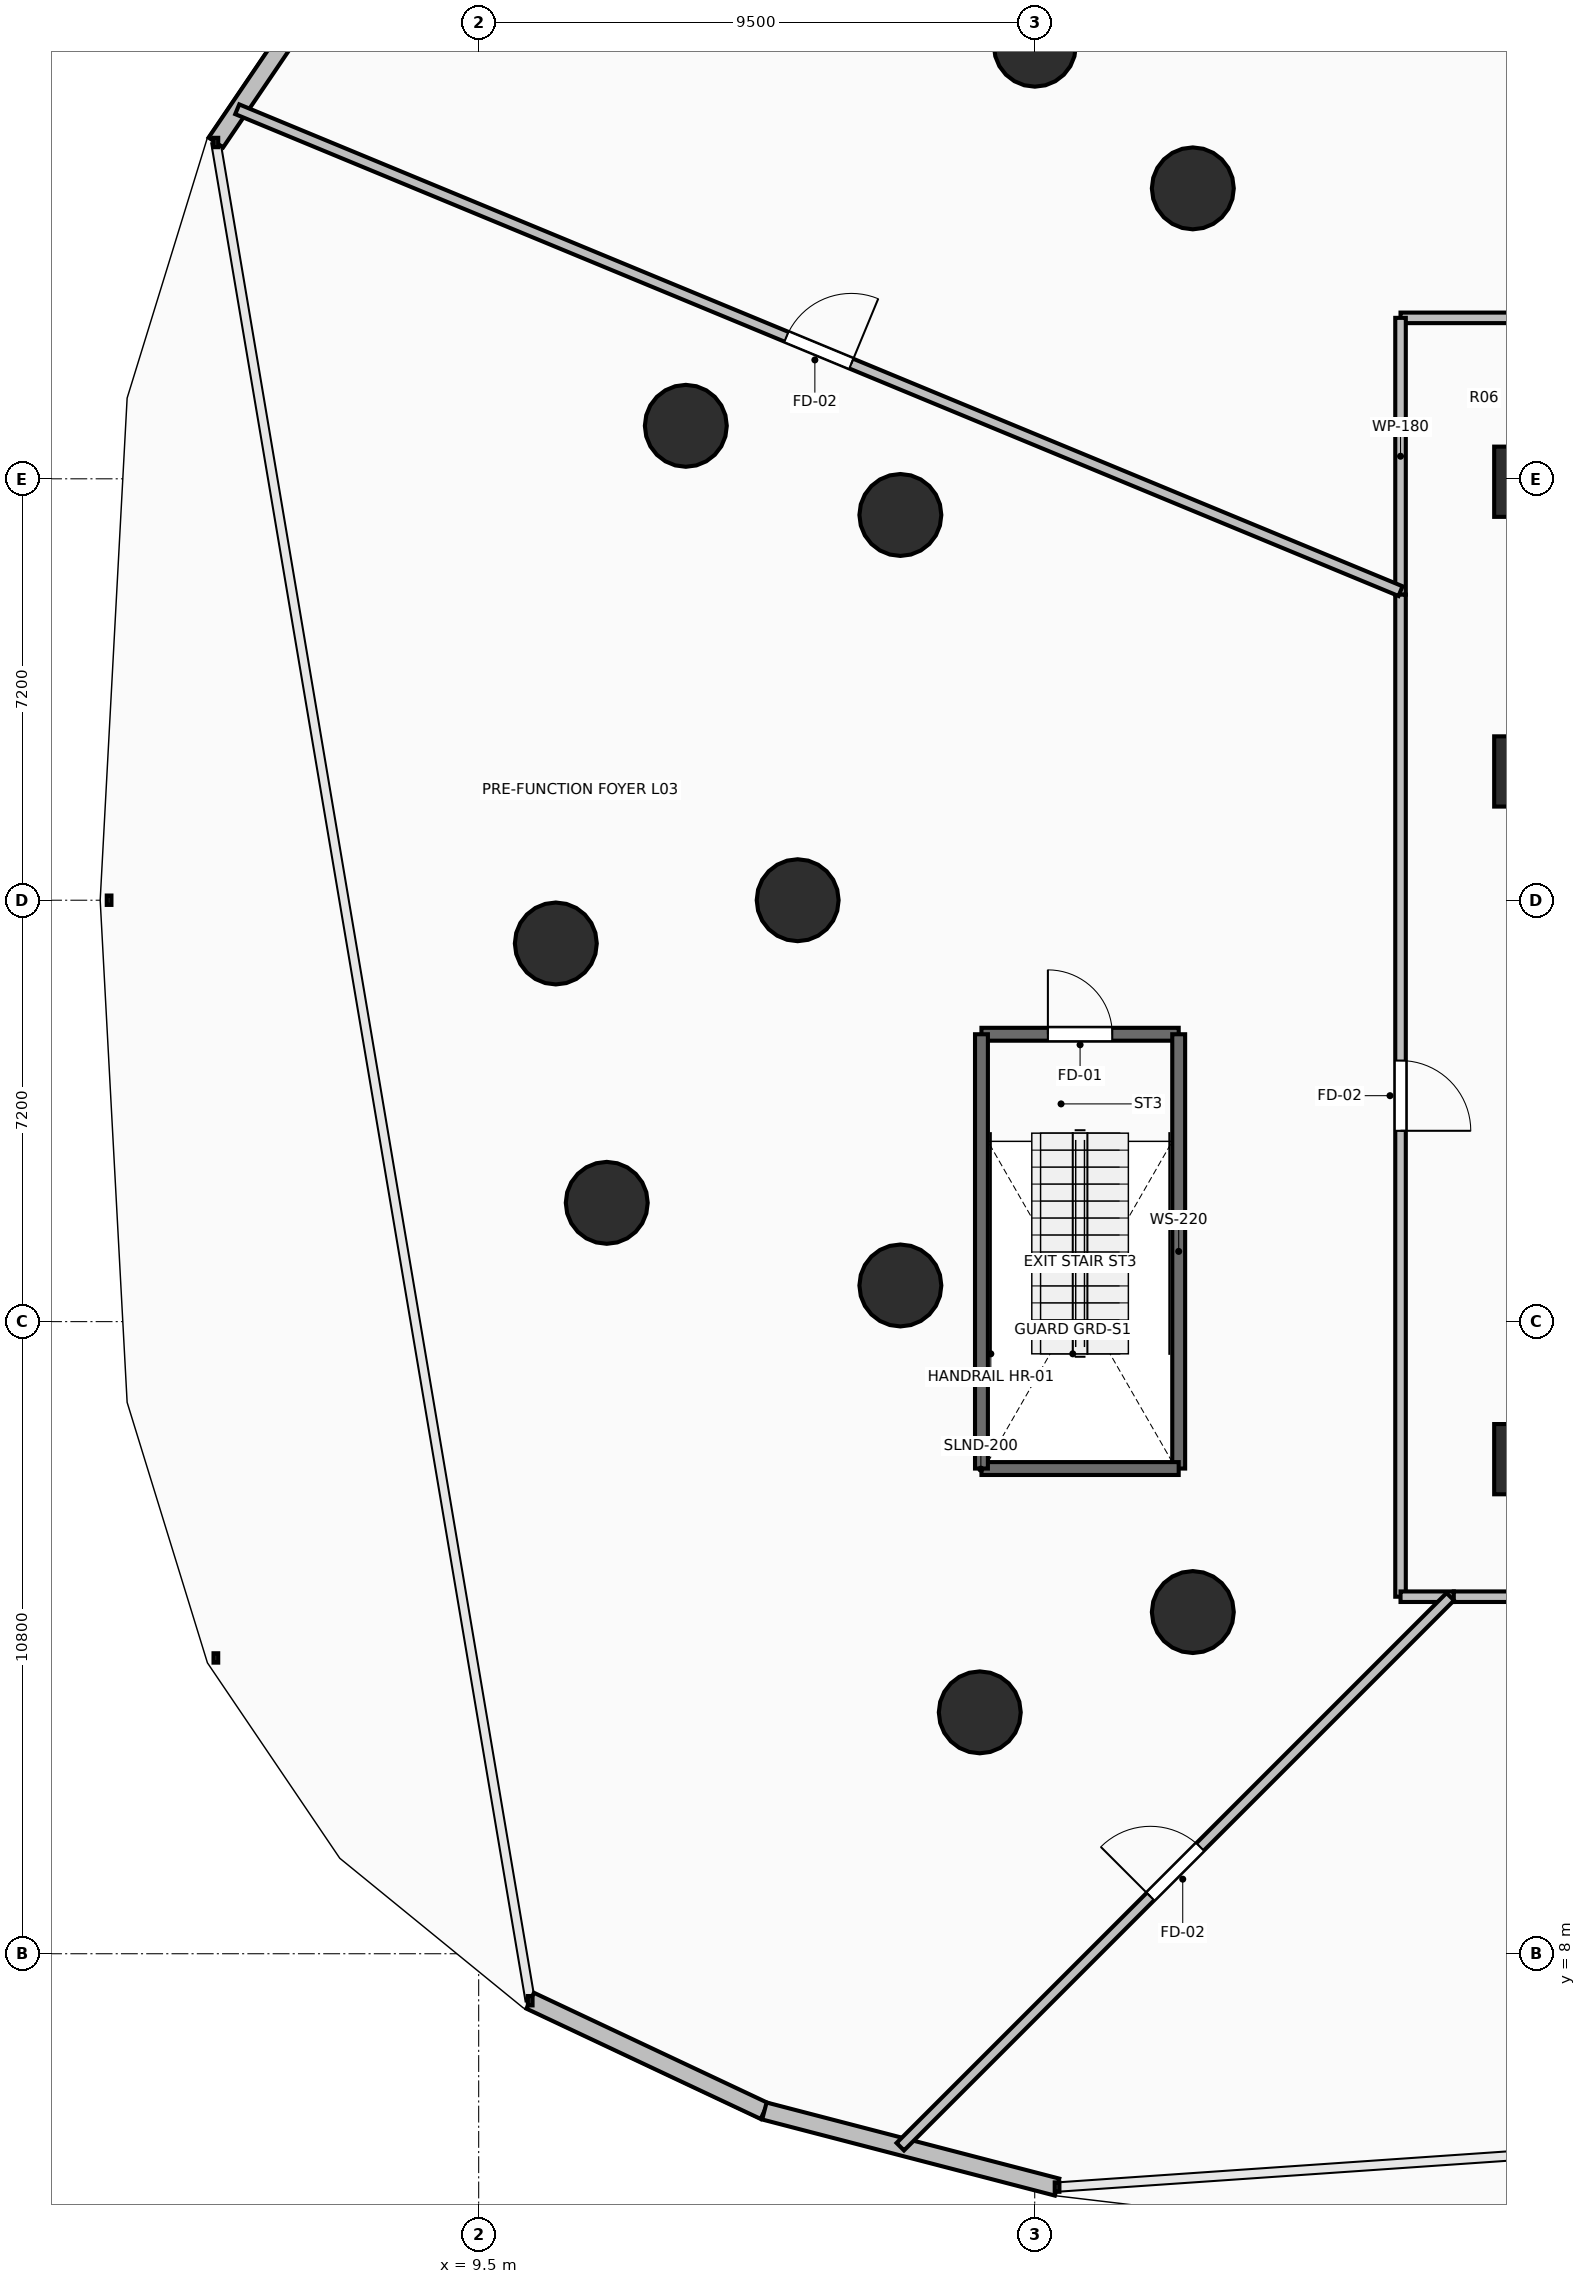
"""IFC4 building model, lengths in metres.
Left out: names, types, materials, properties, quantities, classifications, styles, units other than length and angle.
Written with IfcOpenShell. Run it as: python <this file> out.ifc"""

import sys

from ifc_helpers import new_model, si_unit, direction, frame, frame_2d, origin, origin_2d, place, context, subcontext, project, spatial, rectangle, circle, extrude, element, fill, save


model = new_model("IFC4")
c1 = context("Model", 3, precision=1e-05, world=origin(), true_north=direction((0.0, 1.0)))
c2 = subcontext(c1, "Body", "Model", "MODEL_VIEW")
j1 = project(units=[si_unit("LENGTHUNIT", "METRE"), si_unit("PLANEANGLEUNIT", "RADIAN")], contexts=[c1])
p1 = place(None, origin())
s1 = spatial("IfcSite", under=j1, at=p1, CompositionType="ELEMENT")
p2 = place(p1, origin())
s2 = spatial("IfcBuilding", under=s1, at=p2, CompositionType="ELEMENT")
p3 = place(p2, frame((0.0, 0.0, 14.4)))
s3 = spatial("IfcBuildingStorey", under=s2, at=p3, CompositionType="ELEMENT", Elevation=14.4)
for number, where, z_axis, x_axis in (
    (1, (21.701, 38.162, 0.0), (0.0, 0.0, 1.0), (-0.707, 0.707, 0.0)),
    (2, (16.705, 32.582, 0.0), (0.0, 0.0, 1.0), (-0.924, 0.383, 0.0)),
    (3, (14.95, 26.0, 0.0), (0.0, 0.0, 1.0), (-1.0, 0.0, 0.0)),
    (4, (16.705, 19.418, 0.0), (0.0, 0.0, 1.0), (-0.924, -0.383, 0.0)),
    (5, (21.701, 13.838, 0.0), (0.0, 0.0, 1.0), (-0.707, -0.707, 0.0)),
    (6, (19.003, 40.6, 0.0), (0.0, 0.0, 1.0), (-0.707, 0.707, 0.0)),
    (7, (13.039, 34.105, 0.0), (0.0, 0.0, 1.0), (-0.924, 0.383, 0.0)),
    (8, (10.818, 25.261, 0.0), (0.0, 0.0, 1.0), (-1.0, 0.0, 0.0)),
    (9, (11.688, 20.83, 0.0), (0.0, 0.0, 1.0), (-0.924, -0.383, 0.0)),
    (10, (18.061, 12.124, 0.0), (0.0, 0.0, 1.0), (-0.707, -0.707, 0.0)),
):
    element("IfcColumn", number, at=place(p3, frame(where, z_axis=z_axis, x_axis=x_axis)), inside=s3, PredefinedType="COLUMN", context=c2, shape_type="SweptSolid", body=[
        extrude(circle(Radius=0.7, at=origin_2d()), origin(), (0.0, 0.0, 1.0), 4.8),
    ])
for number, where, z_axis, x_axis in (
    (11, (27.25, 16.45, 0.0), (0.0, 0.0, 1.0), (1.0, 0.0, 0.0)),
    (12, (27.25, 28.2, 0.0), (0.0, 0.0, 1.0), (1.0, 0.0, 0.0)),
    (13, (27.25, 33.15, 0.0), (0.0, 0.0, 1.0), (1.0, 0.0, 0.0)),
):
    element("IfcColumn", number, at=place(p3, frame(where, z_axis=z_axis, x_axis=x_axis)), inside=s3, PredefinedType="PILASTER", context=c2, shape_type="SweptSolid", body=[
        extrude(rectangle(XDim=0.8, YDim=1.2, at=origin_2d()), origin(), (0.0, 0.0, 1.0), 4.8),
    ])
p4 = place(p3, frame((7.261, 42.264, 0.0), z_axis=(0.0, 0.0, 1.0), x_axis=(-0.561523750755, -0.827460619811, 0.0)))
e14 = element("IfcWall", 14, at=p4, inside=s3, PredefinedType="STANDARD", context=c2, shape_type="SweptSolid", body=[
    extrude(rectangle(XDim=4.01, YDim=0.3, at=frame_2d((2.005, 0.0))), origin(), (0.0, 0.0, 1.0), 4.48),
])
p5 = place(p3, frame((10.38, 7.198, 0.0), z_axis=(0.0, 0.0, 1.0), x_axis=(0.904701070817, -0.426046913452, 0.0)))
e15 = element("IfcWall", 15, at=p5, inside=s3, PredefinedType="STANDARD", context=c2, shape_type="SweptSolid", body=[
    extrude(rectangle(XDim=4.423, YDim=0.3, at=frame_2d((2.211, 0.0))), origin(), (0.0, 0.0, 1.0), 4.48),
])
p6 = place(p3, frame((14.381, 5.313, 0.0), z_axis=(0.0, 0.0, 1.0), x_axis=(0.967814681155, -0.251663948434, 0.0)))
e16 = element("IfcWall", 16, at=p6, inside=s3, PredefinedType="STANDARD", context=c2, shape_type="SweptSolid", body=[
    extrude(rectangle(XDim=5.167, YDim=0.3, at=frame_2d((2.583, 0.0))), origin(), (0.0, 0.0, 1.0), 4.48),
])
p7 = place(p3, frame((18.09, 23.71, 0.0), z_axis=(0.0, 0.0, 1.0), x_axis=(1.0, 0.0, 0.0)))
e17 = element("IfcWall", 17, at=p7, inside=s3, PredefinedType="SOLIDWALL", context=c2, shape_type="SweptSolid", body=[
    extrude(rectangle(XDim=3.37, YDim=0.22, at=frame_2d((1.685, 0.0))), origin(), (0.0, 0.0, 1.0), 4.48),
])
p8 = place(p7, frame((1.135, 0.0, 0.0)))
e18 = element("IfcOpeningElement", 18, at=p8, cuts=e17, PredefinedType="OPENING", context=c2, shape_type="SweptSolid", body=[
    extrude(rectangle(XDim=1.1, YDim=2.15, at=frame_2d((0.55, 1.075))), frame((0.0, 0.125, 0.0), z_axis=(0.0, -1.0, 0.0), x_axis=(1.0, 0.0, 0.0)), (0.0, 0.0, 1.0), 0.25),
])
p9 = place(p3, frame((21.46, 23.71, 0.0), z_axis=(0.0, 0.0, 1.0), x_axis=(0.0, -1.0, 0.0)))
e19 = element("IfcWall", 19, at=p9, inside=s3, PredefinedType="SOLIDWALL", context=c2, shape_type="SweptSolid", body=[
    extrude(rectangle(XDim=7.42, YDim=0.22, at=frame_2d((3.71, 0.0))), origin(), (0.0, 0.0, 1.0), 4.48),
])
p10 = place(p3, frame((21.46, 16.29, 0.0), z_axis=(0.0, 0.0, 1.0), x_axis=(-1.0, 0.0, 0.0)))
e20 = element("IfcWall", 20, at=p10, inside=s3, PredefinedType="SOLIDWALL", context=c2, shape_type="SweptSolid", body=[
    extrude(rectangle(XDim=3.37, YDim=0.22, at=frame_2d((1.685, 0.0))), origin(), (0.0, 0.0, 1.0), 4.48),
])
p11 = place(p3, frame((18.09, 16.29, 0.0), z_axis=(0.0, 0.0, 1.0), x_axis=(0.0, 1.0, 0.0)))
e21 = element("IfcWall", 21, at=p11, inside=s3, PredefinedType="SOLIDWALL", context=c2, shape_type="SweptSolid", body=[
    extrude(rectangle(XDim=7.42, YDim=0.22, at=frame_2d((3.71, 0.0))), origin(), (0.0, 0.0, 1.0), 4.48),
])
p12 = place(p3, frame((42.186, 35.95, 0.0), z_axis=(0.0, 0.0, 1.0), x_axis=(-1.0, 0.0, 0.0)))
e22 = element("IfcWall", 22, at=p12, inside=s3, PredefinedType="PARTITIONING", context=c2, shape_type="SweptSolid", body=[
    extrude(rectangle(XDim=16.936, YDim=0.18, at=frame_2d((8.468, 0.0))), origin(), (0.0, 0.0, 1.0), 3.672),
])
p13 = place(p12, frame((7.868, 0.0, 0.0)))
e23 = element("IfcOpeningElement", 23, at=p13, cuts=e22, PredefinedType="OPENING", context=c2, shape_type="SweptSolid", body=[
    extrude(rectangle(XDim=1.2, YDim=2.15, at=frame_2d((0.6, 1.075))), frame((0.0, 0.105, 0.0), z_axis=(0.0, -1.0, 0.0), x_axis=(1.0, 0.0, 0.0)), (0.0, 0.0, 1.0), 0.21),
])
p14 = place(p3, frame((25.25, 35.95, 0.0), z_axis=(0.0, 0.0, 1.0), x_axis=(0.0, -1.0, 0.0)))
e24 = element("IfcWall", 24, at=p14, inside=s3, PredefinedType="PARTITIONING", context=c2, shape_type="SweptSolid", body=[
    extrude(rectangle(XDim=4.729, YDim=0.18, at=frame_2d((2.365, 0.0))), origin(), (0.0, 0.0, 1.0), 3.672),
])
p15 = place(p3, frame((25.25, 31.221, 0.0), z_axis=(0.0, 0.0, 1.0), x_axis=(0.0, -1.0, 0.0)))
e25 = element("IfcWall", 25, at=p15, inside=s3, PredefinedType="PARTITIONING", context=c2, shape_type="SweptSolid", body=[
    extrude(rectangle(XDim=17.121, YDim=0.18, at=frame_2d((8.561, 0.0))), origin(), (0.0, 0.0, 1.0), 3.672),
])
p16 = place(p15, frame((7.96, 0.0, 0.0)))
e26 = element("IfcOpeningElement", 26, at=p16, cuts=e25, PredefinedType="OPENING", context=c2, shape_type="SweptSolid", body=[
    extrude(rectangle(XDim=1.2, YDim=2.15, at=frame_2d((0.6, 1.075))), frame((0.0, 0.105, 0.0), z_axis=(0.0, -1.0, 0.0), x_axis=(1.0, 0.0, 0.0)), (0.0, 0.0, 1.0), 0.21),
])
p17 = place(p3, frame((25.25, 14.1, 0.0), z_axis=(0.0, 0.0, 1.0), x_axis=(1.0, 0.0, 0.0)))
e27 = element("IfcWall", 27, at=p17, inside=s3, PredefinedType="PARTITIONING", context=c2, shape_type="SweptSolid", body=[
    extrude(rectangle(XDim=0.91, YDim=0.18, at=frame_2d((0.455, 0.0))), origin(), (0.0, 0.0, 1.0), 4.114),
])
p18 = place(p3, frame((26.16, 14.1, 0.0), z_axis=(0.0, 0.0, 1.0), x_axis=(1.0, 0.0, 0.0)))
e28 = element("IfcWall", 28, at=p18, inside=s3, PredefinedType="PARTITIONING", context=c2, shape_type="SweptSolid", body=[
    extrude(rectangle(XDim=16.04, YDim=0.18, at=frame_2d((8.02, 0.0))), origin(), (0.0, 0.0, 1.0), 3.672),
])
p19 = place(p18, frame((7.42, 0.0, 0.0)))
e29 = element("IfcOpeningElement", 29, at=p19, cuts=e28, PredefinedType="OPENING", context=c2, shape_type="SweptSolid", body=[
    extrude(rectangle(XDim=1.2, YDim=2.15, at=frame_2d((0.6, 1.075))), frame((0.0, 0.105, 0.0), z_axis=(0.0, -1.0, 0.0), x_axis=(1.0, 0.0, 0.0)), (0.0, 0.0, 1.0), 0.21),
])
p20 = place(p3, frame((5.375, 39.514, 0.0), z_axis=(0.0, 0.0, 1.0), x_axis=(0.923872702064, -0.382699922108, 0.0)))
e30 = element("IfcWall", 30, at=p20, inside=s3, PredefinedType="PARTITIONING", context=c2, shape_type="SweptSolid", body=[
    extrude(rectangle(XDim=21.513, YDim=0.18, at=frame_2d((10.756, 0.0))), origin(), (0.0, 0.0, 1.0), 3.769),
])
p21 = place(p20, frame((10.156, 0.0, 0.0)))
e31 = element("IfcOpeningElement", 31, at=p21, cuts=e30, PredefinedType="OPENING", context=c2, shape_type="SweptSolid", body=[
    extrude(rectangle(XDim=1.2, YDim=2.15, at=frame_2d((0.6, 1.075))), frame((0.0, 0.105, 0.0), z_axis=(0.0, -1.0, 0.0), x_axis=(1.0, 0.0, 0.0)), (0.0, 0.0, 1.0), 0.21),
])
p22 = place(p3, frame((16.703, 4.703, 0.0), z_axis=(0.0, 0.0, 1.0), x_axis=(0.707106781187, 0.707106781187, 0.0)))
e32 = element("IfcWall", 32, at=p22, inside=s3, PredefinedType="PARTITIONING", context=c2, shape_type="SweptSolid", body=[
    extrude(rectangle(XDim=13.29, YDim=0.18, at=frame_2d((6.645, 0.0))), origin(), (0.0, 0.0, 1.0), 3.769),
])
p23 = place(p22, frame((6.045, 0.0, 0.0)))
e33 = element("IfcOpeningElement", 33, at=p23, cuts=e32, PredefinedType="OPENING", context=c2, shape_type="SweptSolid", body=[
    extrude(rectangle(XDim=1.2, YDim=2.15, at=frame_2d((0.6, 1.075))), frame((0.0, 0.105, 0.0), z_axis=(0.0, -1.0, 0.0), x_axis=(1.0, 0.0, 0.0)), (0.0, 0.0, 1.0), 0.21),
])
p24 = place(p8, origin())
e34 = element("IfcDoor", 34, at=p24, inside=s3, OperationType="SINGLE_SWING_LEFT", PredefinedType="DOOR", context=c2, shape_type="SweptSolid", body=[
    extrude(rectangle(XDim=1.1, YDim=2.15, at=frame_2d((0.55, 1.075))), frame((0.0, 0.025, 0.0), z_axis=(0.0, -1.0, 0.0), x_axis=(1.0, 0.0, 0.0)), (0.0, 0.0, 1.0), 0.05),
])
fill(e18, e34)
p25 = place(p16, origin())
e35 = element("IfcDoor", 35, at=p25, inside=s3, OperationType="SINGLE_SWING_RIGHT", PredefinedType="DOOR", context=c2, shape_type="SweptSolid", body=[
    extrude(rectangle(XDim=1.2, YDim=2.15, at=frame_2d((0.6, 1.075))), frame((0.0, 0.025, 0.0), z_axis=(0.0, -1.0, 0.0), x_axis=(1.0, 0.0, 0.0)), (0.0, 0.0, 1.0), 0.05),
])
fill(e26, e35)
p26 = place(p21, origin())
e36 = element("IfcDoor", 36, at=p26, inside=s3, OperationType="SINGLE_SWING_RIGHT", PredefinedType="DOOR", context=c2, shape_type="SweptSolid", body=[
    extrude(rectangle(XDim=1.2, YDim=2.15, at=frame_2d((0.6, 1.075))), frame((0.0, 0.025, 0.0), z_axis=(0.0, -1.0, 0.0), x_axis=(1.0, 0.0, 0.0)), (0.0, 0.0, 1.0), 0.05),
])
fill(e31, e36)
p27 = place(p23, origin())
e37 = element("IfcDoor", 37, at=p27, inside=s3, OperationType="SINGLE_SWING_LEFT", PredefinedType="DOOR", context=c2, shape_type="SweptSolid", body=[
    extrude(rectangle(XDim=1.2, YDim=2.15, at=frame_2d((0.6, 1.075))), frame((0.0, 0.025, 0.0), z_axis=(0.0, -1.0, 0.0), x_axis=(1.0, 0.0, 0.0)), (0.0, 0.0, 1.0), 0.05),
])
fill(e33, e37)
save(model, sys.argv[1])
